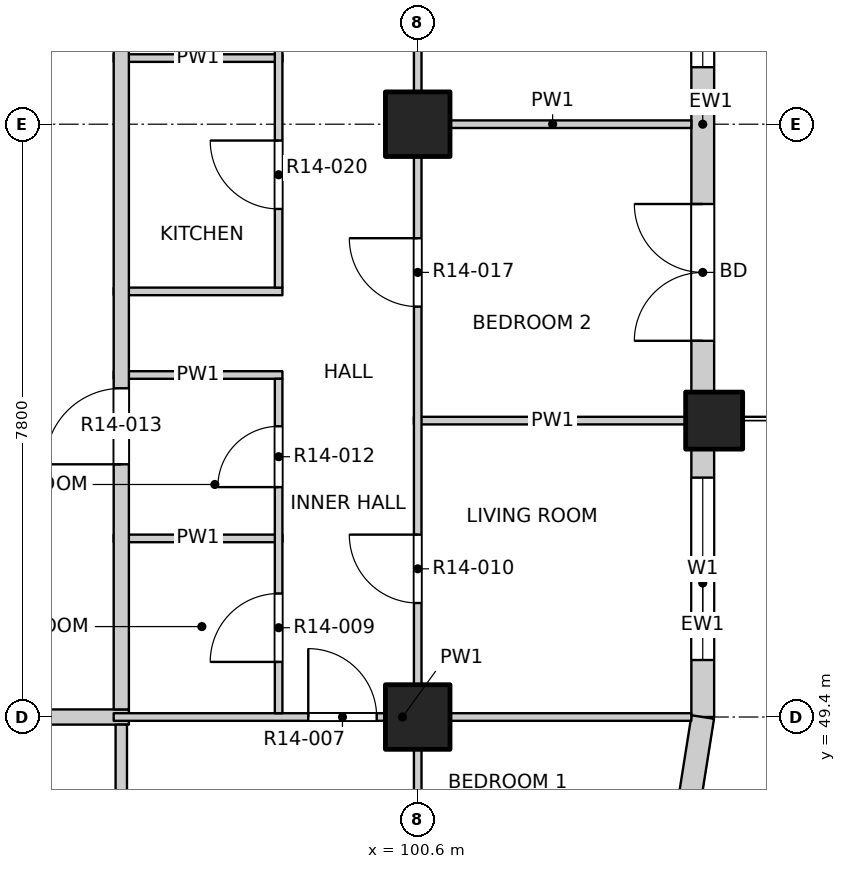
"""IFC4 building model, lengths in metres.
Left out: names, types, materials, properties, quantities, classifications, styles, units other than length and angle.
Written with IfcOpenShell. Run it as: python <this file> out.ifc"""

import sys

from ifc_helpers import new_model, si_unit, direction, frame, frame_2d, origin, origin_2d, place, context, subcontext, project, spatial, rectangle, extrude, element, fill, save


model = new_model("IFC4")
c1 = context("Model", 3, precision=1e-05, world=origin(), true_north=direction((0.0, 1.0)))
c2 = subcontext(c1, "Body", "Model", "MODEL_VIEW")
j1 = project(units=[si_unit("LENGTHUNIT", "METRE"), si_unit("PLANEANGLEUNIT", "RADIAN")], contexts=[c1])
p1 = place(None, origin())
s1 = spatial("IfcSite", under=j1, at=p1, CompositionType="ELEMENT")
p2 = place(p1, origin())
s2 = spatial("IfcBuilding", under=s1, at=p2, CompositionType="ELEMENT")
p3 = place(p2, frame((0.0, 0.0, 152.0)))
s3 = spatial("IfcBuildingStorey", under=s2, at=p3, CompositionType="ELEMENT", Elevation=152.0)
p4 = place(p3, frame((104.5, 53.3, -0.25), z_axis=(0.0, 0.0, 1.0), x_axis=(1.0, 0.0, 0.0)))
e1 = element("IfcColumn", 1, at=p4, inside=s3, PredefinedType="COLUMN", context=c2, shape_type="SweptSolid", body=[
    extrude(rectangle(XDim=0.75, YDim=0.75, at=origin_2d()), origin(), (0.0, 0.0, 1.0), 3.4),
])
for number, where, z_axis, x_axis in (
    (2, (100.6, 49.4, -0.25), (0.0, 0.0, 1.0), (1.0, 0.0, 0.0)),
    (3, (100.6, 57.2, -0.25), (0.0, 0.0, 1.0), (1.0, 0.0, 0.0)),
):
    element("IfcColumn", number, at=place(p3, frame(where, z_axis=z_axis, x_axis=x_axis)), inside=s3, PredefinedType="COLUMN", context=c2, shape_type="SweptSolid", body=[
        extrude(rectangle(XDim=0.85, YDim=0.85, at=origin_2d()), origin(), (0.0, 0.0, 1.0), 3.4),
    ])
p5 = place(p3, frame((104.35, 49.4, 0.0), z_axis=(0.0, 0.0, 1.0), x_axis=(0.0, 1.0, 0.0)))
e4 = element("IfcWall", 4, at=p5, inside=s3, PredefinedType="SOLIDWALL", context=c2, shape_type="SweptSolid", body=[
    extrude(rectangle(XDim=3.525, YDim=0.3, at=frame_2d((1.763, 0.0))), origin(), (0.0, 0.0, 1.0), 2.7),
])
p6 = place(p5, frame((0.75, 0.0, 0.9)))
e5 = element("IfcOpeningElement", 5, at=p6, cuts=e4, PredefinedType="OPENING", context=c2, shape_type="SweptSolid", body=[
    extrude(rectangle(XDim=2.4, YDim=1.8, at=frame_2d((1.2, 0.9))), frame((0.0, 0.16, 0.0), z_axis=(0.0, -1.0, 0.0), x_axis=(1.0, 0.0, 0.0)), (0.0, 0.0, 1.0), 0.32),
])
p7 = place(p3, frame((104.35, 53.675, 0.0), z_axis=(0.0, 0.0, 1.0), x_axis=(0.0, 1.0, 0.0)))
e6 = element("IfcWall", 6, at=p7, inside=s3, PredefinedType="SOLIDWALL", context=c2, shape_type="SweptSolid", body=[
    extrude(rectangle(XDim=7.05, YDim=0.3, at=frame_2d((3.525, 0.0))), origin(), (0.0, 0.0, 1.0), 2.7),
])
p8 = place(p7, frame((0.675, 0.0, 0.0)))
e7 = element("IfcOpeningElement", 7, at=p8, cuts=e6, PredefinedType="OPENING", context=c2, shape_type="SweptSolid", body=[
    extrude(rectangle(XDim=1.8, YDim=2.4, at=frame_2d((0.9, 1.2))), frame((0.0, 0.16, 0.0), z_axis=(0.0, -1.0, 0.0), x_axis=(1.0, 0.0, 0.0)), (0.0, 0.0, 1.0), 0.32),
])
p9 = place(p7, frame((4.275, 0.0, 0.9)))
e8 = element("IfcOpeningElement", 8, at=p9, cuts=e6, PredefinedType="OPENING", context=c2, shape_type="SweptSolid", body=[
    extrude(rectangle(XDim=2.4, YDim=1.8, at=frame_2d((1.2, 0.9))), frame((0.0, 0.16, 0.0), z_axis=(0.0, -1.0, 0.0), x_axis=(1.0, 0.0, 0.0)), (0.0, 0.0, 1.0), 0.32),
])
p10 = place(p3, frame((104.167, 48.241, 0.0), z_axis=(0.0, 0.0, 1.0), x_axis=(0.156496880861, 0.987678452879, 0.0)))
e9 = element("IfcWall", 9, at=p10, inside=s3, PredefinedType="SOLIDWALL", context=c2, shape_type="SweptSolid", body=[
    extrude(rectangle(XDim=1.173, YDim=0.3, at=frame_2d((0.586, 0.0))), origin(), (0.0, 0.0, 1.0), 2.7),
])
p11 = place(p3, frame((73.2, 49.4, 0.0), z_axis=(0.0, 0.0, 1.0), x_axis=(1.0, 0.0, 0.0)))
e10 = element("IfcWall", 10, at=p11, inside=s3, PredefinedType="PARTITIONING", context=c2, shape_type="SweptSolid", body=[
    extrude(rectangle(XDim=23.6, YDim=0.2, at=frame_2d((11.8, 0.0))), origin(), (0.0, 0.0, 1.0), 3.15),
])
p12 = place(p11, frame((4.525, 0.0, 0.0)))
e11 = element("IfcOpeningElement", 11, at=p12, cuts=e10, PredefinedType="OPENING", context=c2, shape_type="SweptSolid", body=[
    extrude(rectangle(XDim=1.2, YDim=2.1, at=frame_2d((0.6, 1.05))), frame((0.0, 0.11, 0.0), z_axis=(0.0, -1.0, 0.0), x_axis=(1.0, 0.0, 0.0)), (0.0, 0.0, 1.0), 0.22),
])
p13 = place(p11, frame((12.325, 0.0, 0.0)))
e12 = element("IfcOpeningElement", 12, at=p13, cuts=e10, PredefinedType="OPENING", context=c2, shape_type="SweptSolid", body=[
    extrude(rectangle(XDim=1.2, YDim=2.1, at=frame_2d((0.6, 1.05))), frame((0.0, 0.11, 0.0), z_axis=(0.0, -1.0, 0.0), x_axis=(1.0, 0.0, 0.0)), (0.0, 0.0, 1.0), 0.22),
])
p14 = place(p11, frame((20.125, 0.0, 0.0)))
e13 = element("IfcOpeningElement", 13, at=p14, cuts=e10, PredefinedType="OPENING", context=c2, shape_type="SweptSolid", body=[
    extrude(rectangle(XDim=1.2, YDim=2.1, at=frame_2d((0.6, 1.05))), frame((0.0, 0.11, 0.0), z_axis=(0.0, -1.0, 0.0), x_axis=(1.0, 0.0, 0.0)), (0.0, 0.0, 1.0), 0.22),
])
p15 = place(p3, frame((96.6, 49.4, 0.0), z_axis=(0.0, 0.0, 1.0), x_axis=(1.0, 0.0, 0.0)))
e14 = element("IfcWall", 14, at=p15, inside=s3, PredefinedType="PARTITIONING", context=c2, shape_type="SweptSolid", body=[
    extrude(rectangle(XDim=7.6, YDim=0.1, at=frame_2d((3.8, 0.0))), origin(), (0.0, 0.0, 1.0), 3.15),
])
p16 = place(p15, frame((2.56, 0.0, 0.0)))
e15 = element("IfcOpeningElement", 15, at=p16, cuts=e14, PredefinedType="OPENING", context=c2, shape_type="SweptSolid", body=[
    extrude(rectangle(XDim=0.9, YDim=2.1, at=frame_2d((0.45, 1.05))), frame((0.0, 0.06, 0.0), z_axis=(0.0, -1.0, 0.0), x_axis=(1.0, 0.0, 0.0)), (0.0, 0.0, 1.0), 0.12),
])
p17 = place(p3, frame((96.6, 51.75, 0.0), z_axis=(0.0, 0.0, 1.0), x_axis=(1.0, 0.0, 0.0)))
e16 = element("IfcWall", 16, at=p17, inside=s3, PredefinedType="PARTITIONING", context=c2, shape_type="SweptSolid", body=[
    extrude(rectangle(XDim=2.22, YDim=0.1, at=frame_2d((1.11, 0.0))), origin(), (0.0, 0.0, 1.0), 3.15),
])
p18 = place(p3, frame((100.55, 53.3, 0.0), z_axis=(0.0, 0.0, 1.0), x_axis=(1.0, 0.0, 0.0)))
e17 = element("IfcWall", 17, at=p18, inside=s3, PredefinedType="PARTITIONING", context=c2, shape_type="SweptSolid", body=[
    extrude(rectangle(XDim=3.65, YDim=0.1, at=frame_2d((1.825, 0.0))), origin(), (0.0, 0.0, 1.0), 3.15),
])
for number, where, z_axis, x_axis in (
    (18, (96.6, 53.9, 0.0), (0.0, 0.0, 1.0), (1.0, 0.0, 0.0)),
    (19, (96.6, 55.0, 0.0), (0.0, 0.0, 1.0), (1.0, 0.0, 0.0)),
):
    element("IfcWall", number, at=place(p3, frame(where, z_axis=z_axis, x_axis=x_axis)), inside=s3, PredefinedType="PARTITIONING", context=c2, shape_type="SweptSolid", body=[
        extrude(rectangle(XDim=2.22, YDim=0.1, at=frame_2d((1.11, 0.0))), origin(), (0.0, 0.0, 1.0), 3.15),
    ])
p19 = place(p3, frame((100.55, 57.2, 0.0), z_axis=(0.0, 0.0, 1.0), x_axis=(1.0, 0.0, 0.0)))
e20 = element("IfcWall", 20, at=p19, inside=s3, PredefinedType="PARTITIONING", context=c2, shape_type="SweptSolid", body=[
    extrude(rectangle(XDim=3.65, YDim=0.1, at=frame_2d((1.825, 0.0))), origin(), (0.0, 0.0, 1.0), 3.15),
])
p20 = place(p3, frame((96.6, 58.07, 0.0), z_axis=(0.0, 0.0, 1.0), x_axis=(1.0, 0.0, 0.0)))
e21 = element("IfcWall", 21, at=p20, inside=s3, PredefinedType="PARTITIONING", context=c2, shape_type="SweptSolid", body=[
    extrude(rectangle(XDim=2.22, YDim=0.1, at=frame_2d((1.11, 0.0))), origin(), (0.0, 0.0, 1.0), 3.15),
])
p21 = place(p3, frame((96.7, 45.8, 0.0), z_axis=(0.0, 0.0, 1.0), x_axis=(0.0, 1.0, 0.0)))
e22 = element("IfcWall", 22, at=p21, inside=s3, PredefinedType="PARTITIONING", context=c2, shape_type="SweptSolid", body=[
    extrude(rectangle(XDim=3.5, YDim=0.15, at=frame_2d((1.75, 0.0))), origin(), (0.0, 0.0, 1.0), 3.15),
])
p22 = place(p3, frame((96.7, 49.5, 0.0), z_axis=(0.0, 0.0, 1.0), x_axis=(0.0, 1.0, 0.0)))
e23 = element("IfcWall", 23, at=p22, inside=s3, PredefinedType="PARTITIONING", context=c2, shape_type="SweptSolid", body=[
    extrude(rectangle(XDim=34.7, YDim=0.2, at=frame_2d((17.35, 0.0))), origin(), (0.0, 0.0, 1.0), 3.15),
])
p23 = place(p22, frame((3.225, 0.0, 0.0)))
e24 = element("IfcOpeningElement", 24, at=p23, cuts=e23, PredefinedType="OPENING", context=c2, shape_type="SweptSolid", body=[
    extrude(rectangle(XDim=1.0, YDim=2.1, at=frame_2d((0.5, 1.05))), frame((0.0, 0.11, 0.0), z_axis=(0.0, -1.0, 0.0), x_axis=(1.0, 0.0, 0.0)), (0.0, 0.0, 1.0), 0.22),
])
p24 = place(p22, frame((19.775, 0.0, 0.0)))
e25 = element("IfcOpeningElement", 25, at=p24, cuts=e23, PredefinedType="OPENING", context=c2, shape_type="SweptSolid", body=[
    extrude(rectangle(XDim=1.0, YDim=2.1, at=frame_2d((0.5, 1.05))), frame((0.0, 0.11, 0.0), z_axis=(0.0, -1.0, 0.0), x_axis=(1.0, 0.0, 0.0)), (0.0, 0.0, 1.0), 0.22),
])
p25 = place(p22, frame((24.125, 0.0, 0.0)))
e26 = element("IfcOpeningElement", 26, at=p25, cuts=e23, PredefinedType="OPENING", context=c2, shape_type="SweptSolid", body=[
    extrude(rectangle(XDim=1.0, YDim=2.1, at=frame_2d((0.5, 1.05))), frame((0.0, 0.11, 0.0), z_axis=(0.0, -1.0, 0.0), x_axis=(1.0, 0.0, 0.0)), (0.0, 0.0, 1.0), 0.22),
])
p26 = place(p3, frame((98.77, 49.45, 0.0), z_axis=(0.0, 0.0, 1.0), x_axis=(0.0, 1.0, 0.0)))
e27 = element("IfcWall", 27, at=p26, inside=s3, PredefinedType="PARTITIONING", context=c2, shape_type="SweptSolid", body=[
    extrude(rectangle(XDim=4.4, YDim=0.1, at=frame_2d((2.2, 0.0))), origin(), (0.0, 0.0, 1.0), 3.15),
])
p27 = place(p26, frame((0.675, 0.0, 0.0)))
e28 = element("IfcOpeningElement", 28, at=p27, cuts=e27, PredefinedType="OPENING", context=c2, shape_type="SweptSolid", body=[
    extrude(rectangle(XDim=0.9, YDim=2.1, at=frame_2d((0.45, 1.05))), frame((0.0, 0.06, 0.0), z_axis=(0.0, -1.0, 0.0), x_axis=(1.0, 0.0, 0.0)), (0.0, 0.0, 1.0), 0.12),
])
p28 = place(p26, frame((2.975, 0.0, 0.0)))
e29 = element("IfcOpeningElement", 29, at=p28, cuts=e27, PredefinedType="OPENING", context=c2, shape_type="SweptSolid", body=[
    extrude(rectangle(XDim=0.8, YDim=2.1, at=frame_2d((0.4, 1.05))), frame((0.0, 0.06, 0.0), z_axis=(0.0, -1.0, 0.0), x_axis=(1.0, 0.0, 0.0)), (0.0, 0.0, 1.0), 0.12),
])
p29 = place(p3, frame((98.77, 55.05, 0.0), z_axis=(0.0, 0.0, 1.0), x_axis=(0.0, 1.0, 0.0)))
e30 = element("IfcWall", 30, at=p29, inside=s3, PredefinedType="PARTITIONING", context=c2, shape_type="SweptSolid", body=[
    extrude(rectangle(XDim=15.35, YDim=0.1, at=frame_2d((7.675, 0.0))), origin(), (0.0, 0.0, 1.0), 3.15),
])
p30 = place(p29, frame((1.035, 0.0, 0.0)))
e31 = element("IfcOpeningElement", 31, at=p30, cuts=e30, PredefinedType="OPENING", context=c2, shape_type="SweptSolid", body=[
    extrude(rectangle(XDim=0.9, YDim=2.1, at=frame_2d((0.45, 1.05))), frame((0.0, 0.06, 0.0), z_axis=(0.0, -1.0, 0.0), x_axis=(1.0, 0.0, 0.0)), (0.0, 0.0, 1.0), 0.12),
])
p31 = place(p29, frame((3.47, 0.0, 0.0)))
e32 = element("IfcOpeningElement", 32, at=p31, cuts=e30, PredefinedType="OPENING", context=c2, shape_type="SweptSolid", body=[
    extrude(rectangle(XDim=0.9, YDim=2.1, at=frame_2d((0.45, 1.05))), frame((0.0, 0.06, 0.0), z_axis=(0.0, -1.0, 0.0), x_axis=(1.0, 0.0, 0.0)), (0.0, 0.0, 1.0), 0.12),
])
p32 = place(p29, frame((5.645, 0.0, 0.0)))
e33 = element("IfcOpeningElement", 33, at=p32, cuts=e30, PredefinedType="OPENING", context=c2, shape_type="SweptSolid", body=[
    extrude(rectangle(XDim=0.8, YDim=2.1, at=frame_2d((0.4, 1.05))), frame((0.0, 0.06, 0.0), z_axis=(0.0, -1.0, 0.0), x_axis=(1.0, 0.0, 0.0)), (0.0, 0.0, 1.0), 0.12),
])
p33 = place(p29, frame((8.21, 0.0, 0.0)))
e34 = element("IfcOpeningElement", 34, at=p33, cuts=e30, PredefinedType="OPENING", context=c2, shape_type="SweptSolid", body=[
    extrude(rectangle(XDim=0.8, YDim=2.1, at=frame_2d((0.4, 1.05))), frame((0.0, 0.06, 0.0), z_axis=(0.0, -1.0, 0.0), x_axis=(1.0, 0.0, 0.0)), (0.0, 0.0, 1.0), 0.12),
])
p34 = place(p29, frame((10.815, 0.0, 0.0)))
e35 = element("IfcOpeningElement", 35, at=p34, cuts=e30, PredefinedType="OPENING", context=c2, shape_type="SweptSolid", body=[
    extrude(rectangle(XDim=0.8, YDim=2.1, at=frame_2d((0.4, 1.05))), frame((0.0, 0.06, 0.0), z_axis=(0.0, -1.0, 0.0), x_axis=(1.0, 0.0, 0.0)), (0.0, 0.0, 1.0), 0.12),
])
p35 = place(p29, frame((13.49, 0.0, 0.0)))
e36 = element("IfcOpeningElement", 36, at=p35, cuts=e30, PredefinedType="OPENING", context=c2, shape_type="SweptSolid", body=[
    extrude(rectangle(XDim=0.9, YDim=2.1, at=frame_2d((0.45, 1.05))), frame((0.0, 0.06, 0.0), z_axis=(0.0, -1.0, 0.0), x_axis=(1.0, 0.0, 0.0)), (0.0, 0.0, 1.0), 0.12),
])
p36 = place(p3, frame((100.6, 45.8, 0.0), z_axis=(0.0, 0.0, 1.0), x_axis=(0.0, 1.0, 0.0)))
e37 = element("IfcWall", 37, at=p36, inside=s3, PredefinedType="PARTITIONING", context=c2, shape_type="SweptSolid", body=[
    extrude(rectangle(XDim=38.4, YDim=0.1, at=frame_2d((19.2, 0.0))), origin(), (0.0, 0.0, 1.0), 3.15),
])
p37 = place(p36, frame((1.05, 0.0, 0.0)))
e38 = element("IfcOpeningElement", 38, at=p37, cuts=e37, PredefinedType="OPENING", context=c2, shape_type="SweptSolid", body=[
    extrude(rectangle(XDim=1.2, YDim=2.1, at=frame_2d((0.6, 1.05))), frame((0.0, 0.06, 0.0), z_axis=(0.0, -1.0, 0.0), x_axis=(1.0, 0.0, 0.0)), (0.0, 0.0, 1.0), 0.12),
])
p38 = place(p36, frame((5.1, 0.0, 0.0)))
e39 = element("IfcOpeningElement", 39, at=p38, cuts=e37, PredefinedType="OPENING", context=c2, shape_type="SweptSolid", body=[
    extrude(rectangle(XDim=0.9, YDim=2.1, at=frame_2d((0.45, 1.05))), frame((0.0, 0.06, 0.0), z_axis=(0.0, -1.0, 0.0), x_axis=(1.0, 0.0, 0.0)), (0.0, 0.0, 1.0), 0.12),
])
p39 = place(p36, frame((9.0, 0.0, 0.0)))
e40 = element("IfcOpeningElement", 40, at=p39, cuts=e37, PredefinedType="OPENING", context=c2, shape_type="SweptSolid", body=[
    extrude(rectangle(XDim=0.9, YDim=2.1, at=frame_2d((0.45, 1.05))), frame((0.0, 0.06, 0.0), z_axis=(0.0, -1.0, 0.0), x_axis=(1.0, 0.0, 0.0)), (0.0, 0.0, 1.0), 0.12),
])
p40 = place(p36, frame((12.9, 0.0, 0.0)))
e41 = element("IfcOpeningElement", 41, at=p40, cuts=e37, PredefinedType="OPENING", context=c2, shape_type="SweptSolid", body=[
    extrude(rectangle(XDim=0.9, YDim=2.1, at=frame_2d((0.45, 1.05))), frame((0.0, 0.06, 0.0), z_axis=(0.0, -1.0, 0.0), x_axis=(1.0, 0.0, 0.0)), (0.0, 0.0, 1.0), 0.12),
])
p41 = place(p36, frame((16.8, 0.0, 0.0)))
e42 = element("IfcOpeningElement", 42, at=p41, cuts=e37, PredefinedType="OPENING", context=c2, shape_type="SweptSolid", body=[
    extrude(rectangle(XDim=0.9, YDim=2.1, at=frame_2d((0.45, 1.05))), frame((0.0, 0.06, 0.0), z_axis=(0.0, -1.0, 0.0), x_axis=(1.0, 0.0, 0.0)), (0.0, 0.0, 1.0), 0.12),
])
p42 = place(p36, frame((20.7, 0.0, 0.0)))
e43 = element("IfcOpeningElement", 43, at=p42, cuts=e37, PredefinedType="OPENING", context=c2, shape_type="SweptSolid", body=[
    extrude(rectangle(XDim=0.9, YDim=2.1, at=frame_2d((0.45, 1.05))), frame((0.0, 0.06, 0.0), z_axis=(0.0, -1.0, 0.0), x_axis=(1.0, 0.0, 0.0)), (0.0, 0.0, 1.0), 0.12),
])
p43 = place(p36, frame((24.6, 0.0, 0.0)))
e44 = element("IfcOpeningElement", 44, at=p43, cuts=e37, PredefinedType="OPENING", context=c2, shape_type="SweptSolid", body=[
    extrude(rectangle(XDim=0.9, YDim=2.1, at=frame_2d((0.45, 1.05))), frame((0.0, 0.06, 0.0), z_axis=(0.0, -1.0, 0.0), x_axis=(1.0, 0.0, 0.0)), (0.0, 0.0, 1.0), 0.12),
])
p44 = place(p36, frame((28.5, 0.0, 0.0)))
e45 = element("IfcOpeningElement", 45, at=p44, cuts=e37, PredefinedType="OPENING", context=c2, shape_type="SweptSolid", body=[
    extrude(rectangle(XDim=0.9, YDim=2.1, at=frame_2d((0.45, 1.05))), frame((0.0, 0.06, 0.0), z_axis=(0.0, -1.0, 0.0), x_axis=(1.0, 0.0, 0.0)), (0.0, 0.0, 1.0), 0.12),
])
p45 = place(p36, frame((32.4, 0.0, 0.0)))
e46 = element("IfcOpeningElement", 46, at=p45, cuts=e37, PredefinedType="OPENING", context=c2, shape_type="SweptSolid", body=[
    extrude(rectangle(XDim=0.9, YDim=2.1, at=frame_2d((0.45, 1.05))), frame((0.0, 0.06, 0.0), z_axis=(0.0, -1.0, 0.0), x_axis=(1.0, 0.0, 0.0)), (0.0, 0.0, 1.0), 0.12),
])
p46 = place(p36, frame((36.15, 0.0, 0.0)))
e47 = element("IfcOpeningElement", 47, at=p46, cuts=e37, PredefinedType="OPENING", context=c2, shape_type="SweptSolid", body=[
    extrude(rectangle(XDim=1.2, YDim=2.1, at=frame_2d((0.6, 1.05))), frame((0.0, 0.06, 0.0), z_axis=(0.0, -1.0, 0.0), x_axis=(1.0, 0.0, 0.0)), (0.0, 0.0, 1.0), 0.12),
])
p47 = place(p6, origin())
e48 = element("IfcWindow", 48, at=p47, inside=s3, PartitioningType="DOUBLE_PANEL_VERTICAL", PredefinedType="WINDOW", context=c2, shape_type="SweptSolid", body=[
    extrude(rectangle(XDim=2.4, YDim=1.8, at=frame_2d((1.2, 0.9))), frame((0.0, 0.03, 0.0), z_axis=(0.0, -1.0, 0.0), x_axis=(1.0, 0.0, 0.0)), (0.0, 0.0, 1.0), 0.06),
])
fill(e5, e48)
p48 = place(p8, origin())
e49 = element("IfcDoor", 49, at=p48, inside=s3, OperationType="DOUBLE_DOOR_SINGLE_SWING", PredefinedType="DOOR", context=c2, shape_type="SweptSolid", body=[
    extrude(rectangle(XDim=1.8, YDim=2.4, at=frame_2d((0.9, 1.2))), frame((0.0, 0.025, 0.0), z_axis=(0.0, -1.0, 0.0), x_axis=(1.0, 0.0, 0.0)), (0.0, 0.0, 1.0), 0.05),
])
fill(e7, e49)
p49 = place(p9, origin())
e50 = element("IfcWindow", 50, at=p49, inside=s3, PartitioningType="DOUBLE_PANEL_VERTICAL", PredefinedType="WINDOW", context=c2, shape_type="SweptSolid", body=[
    extrude(rectangle(XDim=2.4, YDim=1.8, at=frame_2d((1.2, 0.9))), frame((0.0, 0.03, 0.0), z_axis=(0.0, -1.0, 0.0), x_axis=(1.0, 0.0, 0.0)), (0.0, 0.0, 1.0), 0.06),
])
fill(e8, e50)
p50 = place(p16, origin())
e51 = element("IfcDoor", 51, at=p50, inside=s3, OperationType="SINGLE_SWING_LEFT", PredefinedType="DOOR", context=c2, shape_type="SweptSolid", body=[
    extrude(rectangle(XDim=0.9, YDim=2.1, at=frame_2d((0.45, 1.05))), frame((0.0, 0.025, 0.0), z_axis=(0.0, -1.0, 0.0), x_axis=(1.0, 0.0, 0.0)), (0.0, 0.0, 1.0), 0.05),
])
fill(e15, e51)
p51 = place(p27, origin())
e52 = element("IfcDoor", 52, at=p51, inside=s3, OperationType="SINGLE_SWING_LEFT", PredefinedType="DOOR", context=c2, shape_type="SweptSolid", body=[
    extrude(rectangle(XDim=0.9, YDim=2.1, at=frame_2d((0.45, 1.05))), frame((0.0, 0.025, 0.0), z_axis=(0.0, -1.0, 0.0), x_axis=(1.0, 0.0, 0.0)), (0.0, 0.0, 1.0), 0.05),
])
fill(e28, e52)
p52 = place(p38, origin())
e53 = element("IfcDoor", 53, at=p52, inside=s3, OperationType="SINGLE_SWING_RIGHT", PredefinedType="DOOR", context=c2, shape_type="SweptSolid", body=[
    extrude(rectangle(XDim=0.9, YDim=2.1, at=frame_2d((0.45, 1.05))), frame((0.0, 0.025, 0.0), z_axis=(0.0, -1.0, 0.0), x_axis=(1.0, 0.0, 0.0)), (0.0, 0.0, 1.0), 0.05),
])
fill(e39, e53)
p53 = place(p28, origin())
e54 = element("IfcDoor", 54, at=p53, inside=s3, OperationType="SINGLE_SWING_LEFT", PredefinedType="DOOR", context=c2, shape_type="SweptSolid", body=[
    extrude(rectangle(XDim=0.8, YDim=2.1, at=frame_2d((0.4, 1.05))), frame((0.0, 0.025, 0.0), z_axis=(0.0, -1.0, 0.0), x_axis=(1.0, 0.0, 0.0)), (0.0, 0.0, 1.0), 0.05),
])
fill(e29, e54)
p54 = place(p23, origin())
e55 = element("IfcDoor", 55, at=p54, inside=s3, OperationType="SINGLE_SWING_RIGHT", PredefinedType="DOOR", context=c2, shape_type="SweptSolid", body=[
    extrude(rectangle(XDim=1.0, YDim=2.1, at=frame_2d((0.5, 1.05))), frame((0.0, 0.025, 0.0), z_axis=(0.0, -1.0, 0.0), x_axis=(1.0, 0.0, 0.0)), (0.0, 0.0, 1.0), 0.05),
])
fill(e24, e55)
p55 = place(p39, origin())
e56 = element("IfcDoor", 56, at=p55, inside=s3, OperationType="SINGLE_SWING_RIGHT", PredefinedType="DOOR", context=c2, shape_type="SweptSolid", body=[
    extrude(rectangle(XDim=0.9, YDim=2.1, at=frame_2d((0.45, 1.05))), frame((0.0, 0.025, 0.0), z_axis=(0.0, -1.0, 0.0), x_axis=(1.0, 0.0, 0.0)), (0.0, 0.0, 1.0), 0.05),
])
fill(e40, e56)
p56 = place(p30, origin())
e57 = element("IfcDoor", 57, at=p56, inside=s3, OperationType="SINGLE_SWING_RIGHT", PredefinedType="DOOR", context=c2, shape_type="SweptSolid", body=[
    extrude(rectangle(XDim=0.9, YDim=2.1, at=frame_2d((0.45, 1.05))), frame((0.0, 0.025, 0.0), z_axis=(0.0, -1.0, 0.0), x_axis=(1.0, 0.0, 0.0)), (0.0, 0.0, 1.0), 0.05),
])
fill(e31, e57)
save(model, sys.argv[1])
